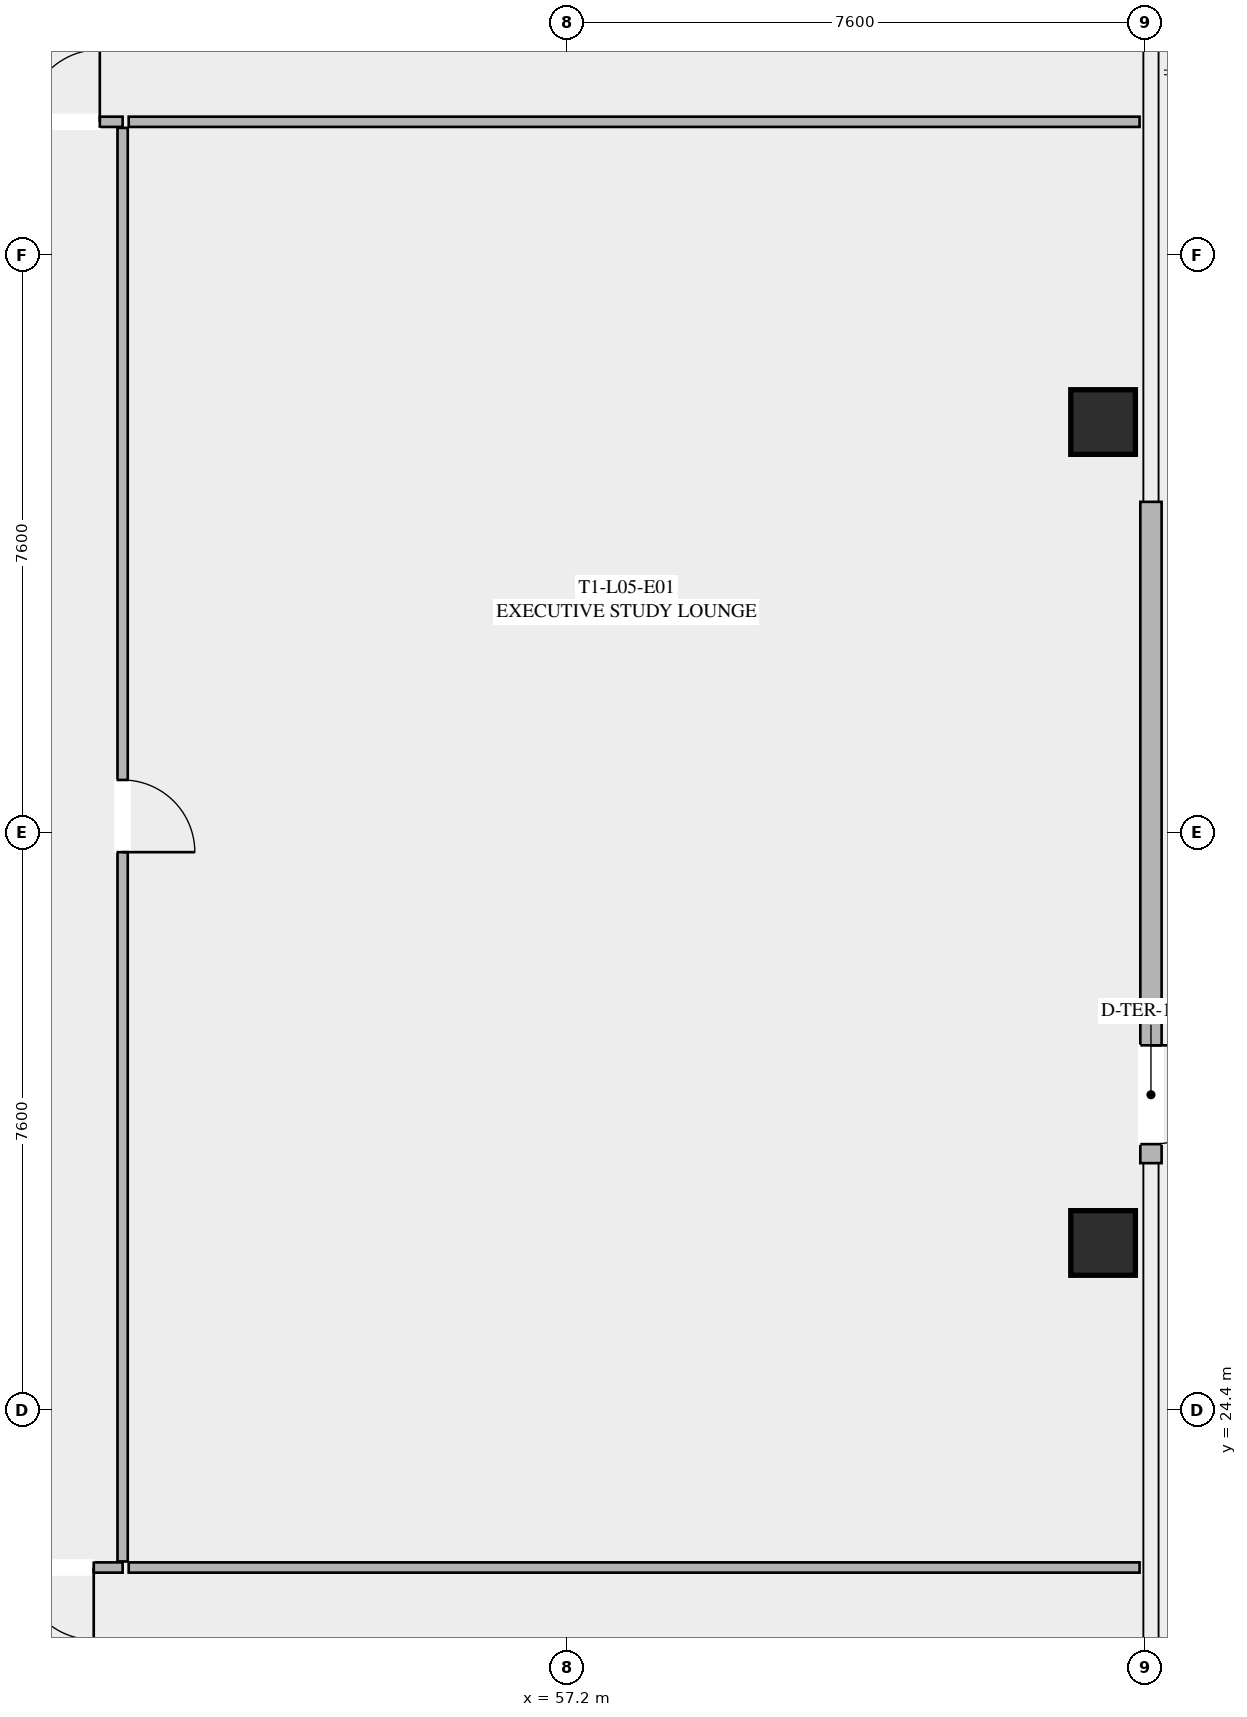
"""IFC4 building model, lengths in metres.
Left out: names, types, materials, properties, quantities, classifications, styles, units other than length and angle.
Written with IfcOpenShell. Run it as: python <this file> out.ifc"""

import sys

from ifc_helpers import new_model, si_unit, direction, frame, frame_2d, origin, origin_2d, place, context, subcontext, project, spatial, rectangle, hollow_rectangle, extrude, element, fill, save


model = new_model("IFC4")
c1 = context("Model", 3, precision=1e-05, world=origin(), true_north=direction((0.0, 1.0)))
c2 = subcontext(c1, "Body", "Model", "MODEL_VIEW")
j1 = project(units=[si_unit("LENGTHUNIT", "METRE"), si_unit("PLANEANGLEUNIT", "RADIAN")], contexts=[c1])
p1 = place(None, origin())
s1 = spatial("IfcSite", under=j1, at=p1, CompositionType="ELEMENT")
p2 = place(p1, origin())
s2 = spatial("IfcBuilding", under=s1, at=p2, CompositionType="ELEMENT")
p3 = place(p2, frame((0.0, 0.0, 24.6)))
s3 = spatial("IfcBuildingStorey", under=s2, at=p3, CompositionType="ELEMENT", Elevation=24.6)
for number, where, z_axis, x_axis in (
    (1, (64.25, 26.6, 0.0), (0.0, 0.0, 1.0), (1.0, 0.0, 0.0)),
    (2, (64.25, 37.4, 0.0), (0.0, 0.0, 1.0), (1.0, 0.0, 0.0)),
):
    element("IfcColumn", number, at=place(p3, frame(where, z_axis=z_axis, x_axis=x_axis)), inside=s3, PredefinedType="COLUMN", context=c2, shape_type="SweptSolid", body=[
        extrude(hollow_rectangle(XDim=0.85, YDim=0.85, WallThickness=0.035, at=origin_2d()), origin(), (0.0, 0.0, 1.0), 3.35),
    ])
p4 = place(p3, frame((64.88, 36.35, 0.0), z_axis=(0.0, 0.0, 1.0), x_axis=(0.0, -1.0, 0.0)))
e3 = element("IfcWall", 3, at=p4, inside=s3, PredefinedType="SOLIDWALL", context=c2, shape_type="SweptSolid", body=[
    extrude(rectangle(XDim=8.7, YDim=0.28, at=frame_2d((4.35, 0.0))), origin(), (0.0, 0.0, 1.0), 3.35),
])
p5 = place(p4, frame((7.15, 0.0, 0.0)))
e4 = element("IfcOpeningElement", 4, at=p5, cuts=e3, PredefinedType="OPENING", context=c2, shape_type="SweptSolid", body=[
    extrude(rectangle(XDim=1.3, YDim=2.15, at=frame_2d((0.65, 1.075))), frame((0.0, 0.15, 0.0), z_axis=(0.0, -1.0, 0.0), x_axis=(1.0, 0.0, 0.0)), (0.0, 0.0, 1.0), 0.3),
])
p6 = place(p3, frame((22.35, 41.35, 0.0), z_axis=(0.0, 0.0, 1.0), x_axis=(1.0, 0.0, 0.0)))
e5 = element("IfcWall", 5, at=p6, inside=s3, PredefinedType="PARTITIONING", context=c2, shape_type="SweptSolid", body=[
    extrude(rectangle(XDim=29.0, YDim=0.135, at=frame_2d((14.5, 0.0))), origin(), (0.0, 0.0, 1.0), 2.703),
])
p7 = place(p6, frame((0.3, 0.0, 0.0)))
e6 = element("IfcOpeningElement", 6, at=p7, cuts=e5, PredefinedType="OPENING", context=c2, shape_type="SweptSolid", body=[
    extrude(rectangle(XDim=0.95, YDim=2.05, at=frame_2d((0.475, 1.025))), frame((0.0, 0.077, 0.0), z_axis=(0.0, -1.0, 0.0), x_axis=(1.0, 0.0, 0.0)), (0.0, 0.0, 1.0), 0.155),
])
p8 = place(p6, frame((19.299, 0.0, 0.0)))
e7 = element("IfcOpeningElement", 7, at=p8, cuts=e5, PredefinedType="OPENING", context=c2, shape_type="SweptSolid", body=[
    extrude(rectangle(XDim=0.95, YDim=2.05, at=frame_2d((0.475, 1.025))), frame((0.0, 0.077, 0.0), z_axis=(0.0, -1.0, 0.0), x_axis=(1.0, 0.0, 0.0)), (0.0, 0.0, 1.0), 0.155),
])
p9 = place(p6, frame((27.75, 0.0, 0.0)))
e8 = element("IfcOpeningElement", 8, at=p9, cuts=e5, PredefinedType="OPENING", context=c2, shape_type="SweptSolid", body=[
    extrude(rectangle(XDim=0.95, YDim=2.05, at=frame_2d((0.475, 1.025))), frame((0.0, 0.077, 0.0), z_axis=(0.0, -1.0, 0.0), x_axis=(1.0, 0.0, 0.0)), (0.0, 0.0, 1.0), 0.155),
])
p10 = place(p3, frame((51.35, 22.33, 0.0), z_axis=(0.0, 0.0, 1.0), x_axis=(-1.0, 0.0, 0.0)))
e9 = element("IfcWall", 9, at=p10, inside=s3, PredefinedType="PARTITIONING", context=c2, shape_type="SweptSolid", body=[
    extrude(rectangle(XDim=29.0, YDim=0.135, at=frame_2d((14.5, 0.0))), origin(), (0.0, 0.0, 1.0), 2.703),
])
p11 = place(p10, frame((27.67, 0.0, 0.0)))
e10 = element("IfcOpeningElement", 10, at=p11, cuts=e9, PredefinedType="OPENING", context=c2, shape_type="SweptSolid", body=[
    extrude(rectangle(XDim=0.95, YDim=2.05, at=frame_2d((0.475, 1.025))), frame((0.0, 0.077, 0.0), z_axis=(0.0, -1.0, 0.0), x_axis=(1.0, 0.0, 0.0)), (0.0, 0.0, 1.0), 0.155),
])
p12 = place(p10, frame((8.775, 0.0, 0.0)))
e11 = element("IfcOpeningElement", 11, at=p12, cuts=e9, PredefinedType="OPENING", context=c2, shape_type="SweptSolid", body=[
    extrude(rectangle(XDim=0.95, YDim=2.05, at=frame_2d((0.475, 1.025))), frame((0.0, 0.077, 0.0), z_axis=(0.0, -1.0, 0.0), x_axis=(1.0, 0.0, 0.0)), (0.0, 0.0, 1.0), 0.155),
])
p13 = place(p10, frame((0.38, 0.0, 0.0)))
e12 = element("IfcOpeningElement", 12, at=p13, cuts=e9, PredefinedType="OPENING", context=c2, shape_type="SweptSolid", body=[
    extrude(rectangle(XDim=0.95, YDim=2.05, at=frame_2d((0.475, 1.025))), frame((0.0, 0.077, 0.0), z_axis=(0.0, -1.0, 0.0), x_axis=(1.0, 0.0, 0.0)), (0.0, 0.0, 1.0), 0.155),
])
p14 = place(p3, frame((51.35, 41.27, 0.0), z_axis=(0.0, 0.0, 1.0), x_axis=(0.0, -1.0, 0.0)))
e13 = element("IfcWall", 13, at=p14, inside=s3, PredefinedType="PARTITIONING", context=c2, shape_type="SweptSolid", body=[
    extrude(rectangle(XDim=18.86, YDim=0.135, at=frame_2d((9.43, 0.0))), origin(), (0.0, 0.0, 1.0), 2.703),
])
p15 = place(p14, frame((8.579, 0.0, 0.0)))
e14 = element("IfcOpeningElement", 14, at=p15, cuts=e13, PredefinedType="OPENING", context=c2, shape_type="SweptSolid", body=[
    extrude(rectangle(XDim=0.95, YDim=2.05, at=frame_2d((0.475, 1.025))), frame((0.0, 0.077, 0.0), z_axis=(0.0, -1.0, 0.0), x_axis=(1.0, 0.0, 0.0)), (0.0, 0.0, 1.0), 0.155),
])
for number, where, z_axis, x_axis in (
    (15, (64.73, 41.35, 0.0), (0.0, 0.0, 1.0), (-1.0, 0.0, 0.0)),
    (16, (51.43, 22.33, 0.0), (0.0, 0.0, 1.0), (1.0, 0.0, 0.0)),
):
    element("IfcWall", number, at=place(p3, frame(where, z_axis=z_axis, x_axis=x_axis)), inside=s3, PredefinedType="PARTITIONING", context=c2, shape_type="SweptSolid", body=[
        extrude(rectangle(XDim=13.3, YDim=0.135, at=frame_2d((6.65, 0.0))), origin(), (0.0, 0.0, 1.0), 2.703),
    ])
p16 = place(p5, origin())
e17 = element("IfcDoor", 17, at=p16, inside=s3, OperationType="SINGLE_SWING_LEFT", PredefinedType="DOOR", context=c2, shape_type="SweptSolid", body=[
    extrude(rectangle(XDim=1.3, YDim=2.15, at=frame_2d((0.65, 1.075))), frame((0.0, 0.025, 0.0), z_axis=(0.0, -1.0, 0.0), x_axis=(1.0, 0.0, 0.0)), (0.0, 0.0, 1.0), 0.05),
])
fill(e4, e17)
p17 = place(p9, origin())
e18 = element("IfcDoor", 18, at=p17, inside=s3, OperationType="SINGLE_SWING_RIGHT", PredefinedType="DOOR", context=c2, shape_type="SweptSolid", body=[
    extrude(rectangle(XDim=0.95, YDim=2.05, at=frame_2d((0.475, 1.025))), frame((0.0, 0.025, 0.0), z_axis=(0.0, -1.0, 0.0), x_axis=(1.0, 0.0, 0.0)), (0.0, 0.0, 1.0), 0.05),
])
fill(e8, e18)
p18 = place(p13, origin())
e19 = element("IfcDoor", 19, at=p18, inside=s3, OperationType="SINGLE_SWING_LEFT", PredefinedType="DOOR", context=c2, shape_type="SweptSolid", body=[
    extrude(rectangle(XDim=0.95, YDim=2.05, at=frame_2d((0.475, 1.025))), frame((0.0, 0.025, 0.0), z_axis=(0.0, -1.0, 0.0), x_axis=(1.0, 0.0, 0.0)), (0.0, 0.0, 1.0), 0.05),
])
fill(e12, e19)
p19 = place(p15, origin())
e20 = element("IfcDoor", 20, at=p19, inside=s3, OperationType="SINGLE_SWING_RIGHT", PredefinedType="DOOR", context=c2, shape_type="SweptSolid", body=[
    extrude(rectangle(XDim=0.95, YDim=2.05, at=frame_2d((0.475, 1.025))), frame((0.0, 0.025, 0.0), z_axis=(0.0, -1.0, 0.0), x_axis=(1.0, 0.0, 0.0)), (0.0, 0.0, 1.0), 0.05),
])
fill(e14, e20)
save(model, sys.argv[1])
